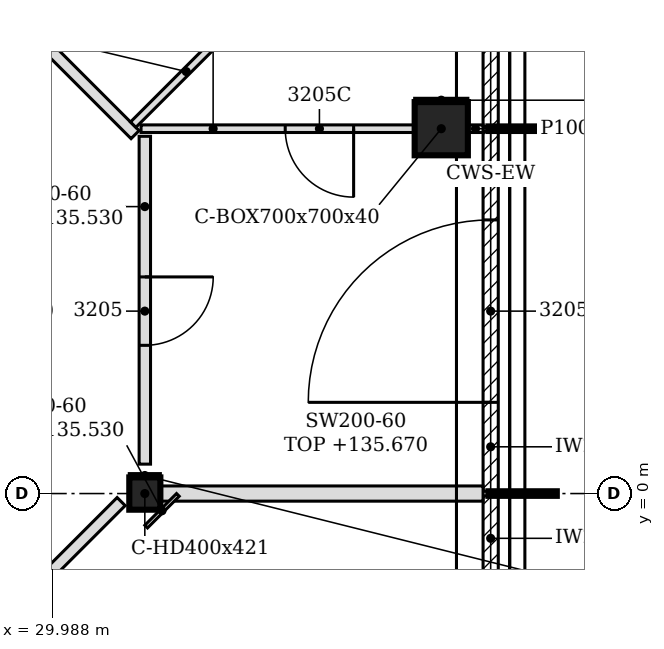
"""IFC4 building model, lengths in metres.
Left out: names, types, materials, properties, quantities, classifications, styles, units other than length and angle.
Written with IfcOpenShell. Run it as: python <this file> out.ifc"""

import sys

from ifc_helpers import new_model, si_unit, direction, frame, frame_2d, origin, origin_2d, place, context, subcontext, project, spatial, polyline, rectangle, hollow_rectangle, i_section, outline, extrude, element, fill, save


model = new_model("IFC4")
c1 = context("Model", 3, precision=1e-05, world=origin(), true_north=direction((0.0, 1.0)))
c2 = subcontext(c1, "Body", "Model", "MODEL_VIEW")
j1 = project(units=[si_unit("LENGTHUNIT", "METRE"), si_unit("PLANEANGLEUNIT", "RADIAN")], contexts=[c1])
p1 = place(None, origin())
s1 = spatial("IfcSite", under=j1, at=p1, CompositionType="ELEMENT")
p2 = place(p1, origin())
s2 = spatial("IfcBuilding", under=s1, at=p2, CompositionType="ELEMENT")
p3 = place(p2, frame((0.0, 0.0, 132.6)))
s3 = spatial("IfcBuildingStorey", under=s2, at=p3, CompositionType="ELEMENT", Elevation=132.6)
p4 = place(p3, frame((35.1, 4.8, -0.15), z_axis=(0.0, 0.0, 1.0), x_axis=(1.0, 0.0, 0.0)))
e1 = element("IfcColumn", 1, at=p4, inside=s3, PredefinedType="COLUMN", context=c2, shape_type="SweptSolid", body=[
    extrude(hollow_rectangle(XDim=0.7, YDim=0.7, WallThickness=0.04, at=origin_2d()), origin(), (0.0, 0.0, 1.0), 3.6),
])
p5 = place(p3, frame((31.2, 0.0, -0.15), z_axis=(0.0, 0.0, 1.0), x_axis=(1.0, 0.0, 0.0)))
e2 = element("IfcColumn", 2, at=p5, inside=s3, PredefinedType="COLUMN", context=c2, shape_type="SweptSolid", body=[
    extrude(i_section(OverallWidth=0.409, OverallDepth=0.425, WebThickness=0.033, FlangeThickness=0.052, FilletRadius=0.015, at=origin_2d()), origin(), (0.0, 0.0, 1.0), 3.6),
])
p6 = place(p3, frame((35.75, -4.656, 0.0), z_axis=(0.0, 0.0, 1.0), x_axis=(0.0, 1.0, 0.0)))
e3 = element("IfcWall", 3, at=p6, inside=s3, PredefinedType="NOTDEFINED", context=c2, shape_type="SweptSolid", body=[
    extrude(rectangle(XDim=4.626, YDim=0.2, at=frame_2d((2.313, 0.0))), origin(), (0.0, 0.0, 1.0), 3.45),
])
p7 = place(p6, frame((1.108, 0.0, 0.0)))
e4 = element("IfcOpeningElement", 4, at=p7, cuts=e3, PredefinedType="OPENING", context=c2, shape_type="SweptSolid", body=[
    extrude(rectangle(XDim=2.4, YDim=2.4, at=frame_2d((1.2, 1.2))), frame((0.0, 0.11, 0.0), z_axis=(0.0, -1.0, 0.0), x_axis=(1.0, 0.0, 0.0)), (0.0, 0.0, 1.0), 0.22),
])
p8 = place(p3, frame((35.75, 0.03, 0.0), z_axis=(0.0, 0.0, 1.0), x_axis=(0.0, 1.0, 0.0)))
e5 = element("IfcWall", 5, at=p8, inside=s3, PredefinedType="NOTDEFINED", context=c2, shape_type="SweptSolid", body=[
    extrude(rectangle(XDim=4.74, YDim=0.2, at=frame_2d((2.37, 0.0))), origin(), (0.0, 0.0, 1.0), 3.45),
])
p9 = place(p8, frame((1.17, 0.0, 0.0)))
e6 = element("IfcOpeningElement", 6, at=p9, cuts=e5, PredefinedType="OPENING", context=c2, shape_type="SweptSolid", body=[
    extrude(rectangle(XDim=2.4, YDim=2.4, at=frame_2d((1.2, 1.2))), frame((0.0, 0.11, 0.0), z_axis=(0.0, -1.0, 0.0), x_axis=(1.0, 0.0, 0.0)), (0.0, 0.0, 1.0), 0.22),
])
p10 = place(p3, frame((35.75, 4.83, 0.0), z_axis=(0.0, 0.0, 1.0), x_axis=(0.0, 1.0, 0.0)))
e7 = element("IfcWall", 7, at=p10, inside=s3, PredefinedType="NOTDEFINED", context=c2, shape_type="SweptSolid", body=[
    extrude(rectangle(XDim=4.74, YDim=0.2, at=frame_2d((2.37, 0.0))), origin(), (0.0, 0.0, 1.0), 3.45),
])
p11 = place(p10, frame((1.17, 0.0, 0.0)))
e8 = element("IfcOpeningElement", 8, at=p11, cuts=e7, PredefinedType="OPENING", context=c2, shape_type="SweptSolid", body=[
    extrude(rectangle(XDim=2.4, YDim=2.4, at=frame_2d((1.2, 1.2))), frame((0.0, 0.11, 0.0), z_axis=(0.0, -1.0, 0.0), x_axis=(1.0, 0.0, 0.0)), (0.0, 0.0, 1.0), 0.22),
])
p12 = place(p3, frame((22.722, -8.272, 0.0), z_axis=(0.0, 0.0, 1.0), x_axis=(0.707106781187, 0.707106781187, 0.0)))
e9 = element("IfcWall", 9, at=p12, inside=s3, PredefinedType="PARTITIONING", context=c2, shape_type="SweptSolid", body=[
    extrude(rectangle(XDim=11.549, YDim=0.15, at=frame_2d((5.774, 0.0))), origin(), (0.0, 0.0, 1.0), 2.88),
])
p13 = place(p12, frame((1.925, 0.0, 0.0)))
e10 = element("IfcOpeningElement", 10, at=p13, cuts=e9, PredefinedType="OPENING", context=c2, shape_type="SweptSolid", body=[
    extrude(rectangle(XDim=0.9, YDim=2.1, at=frame_2d((0.45, 1.05))), frame((0.0, 0.085, 0.0), z_axis=(0.0, -1.0, 0.0), x_axis=(1.0, 0.0, 0.0)), (0.0, 0.0, 1.0), 0.17),
])
p14 = place(p12, frame((9.065, 0.0, 0.0)))
e11 = element("IfcOpeningElement", 11, at=p14, cuts=e9, PredefinedType="OPENING", context=c2, shape_type="SweptSolid", body=[
    extrude(rectangle(XDim=0.9, YDim=2.1, at=frame_2d((0.45, 1.05))), frame((0.0, 0.085, 0.0), z_axis=(0.0, -1.0, 0.0), x_axis=(1.0, 0.0, 0.0)), (0.0, 0.0, 1.0), 0.17),
])
p15 = place(p3, frame((31.405, 0.0, 0.0), z_axis=(0.0, 0.0, 1.0), x_axis=(1.0, 0.0, 0.0)))
e12 = element("IfcWall", 12, at=p15, inside=s3, PredefinedType="PARTITIONING", context=c2, shape_type="SweptSolid", body=[
    extrude(outline(polyline([(0.0, 0.0), (4.245, 0.0), (4.246, 3.07), (3.845, 3.07), (3.844, 2.93), (3.545, 2.93), (3.543, 3.07), (0.0, 3.07), (0.0, 0.0)])), frame((0.0, 0.1, 0.0), z_axis=(0.0, -1.0, 0.0), x_axis=(1.0, 0.0, 0.0)), (0.0, 0.0, 1.0), 0.2),
])
p16 = place(p3, frame((31.2, 0.387, 0.0), z_axis=(0.0, 0.0, 1.0), x_axis=(0.0, 1.0, 0.0)))
e13 = element("IfcWall", 13, at=p16, inside=s3, PredefinedType="PARTITIONING", context=c2, shape_type="SweptSolid", body=[
    extrude(rectangle(XDim=4.313, YDim=0.15, at=frame_2d((2.156, 0.0))), origin(), (0.0, 0.0, 1.0), 2.93),
])
p17 = place(p16, frame((1.563, 0.0, 0.0)))
e14 = element("IfcOpeningElement", 14, at=p17, cuts=e13, PredefinedType="OPENING", context=c2, shape_type="SweptSolid", body=[
    extrude(rectangle(XDim=0.9, YDim=2.1, at=frame_2d((0.45, 1.05))), frame((0.0, 0.085, 0.0), z_axis=(0.0, -1.0, 0.0), x_axis=(1.0, 0.0, 0.0)), (0.0, 0.0, 1.0), 0.17),
])
p18 = place(p3, frame((31.072, 4.722, 0.0), z_axis=(0.0, 0.0, 1.0), x_axis=(-0.707106781187, 0.707106781187, 0.0)))
e15 = element("IfcWall", 15, at=p18, inside=s3, PredefinedType="PARTITIONING", context=c2, shape_type="SweptSolid", body=[
    extrude(rectangle(XDim=23.688, YDim=0.15, at=frame_2d((11.844, 0.0))), origin(), (0.0, 0.0, 1.0), 2.73),
])
p19 = place(p18, frame((8.135, 0.0, 0.0)))
e16 = element("IfcOpeningElement", 16, at=p19, cuts=e15, PredefinedType="OPENING", context=c2, shape_type="SweptSolid", body=[
    extrude(rectangle(XDim=0.9, YDim=2.1, at=frame_2d((0.45, 1.05))), frame((0.0, 0.085, 0.0), z_axis=(0.0, -1.0, 0.0), x_axis=(1.0, 0.0, 0.0)), (0.0, 0.0, 1.0), 0.17),
])
p20 = place(p18, frame((13.091, 0.0, 0.0)))
e17 = element("IfcOpeningElement", 17, at=p20, cuts=e15, PredefinedType="OPENING", context=c2, shape_type="SweptSolid", body=[
    extrude(rectangle(XDim=0.9, YDim=2.1, at=frame_2d((0.45, 1.05))), frame((0.0, 0.085, 0.0), z_axis=(0.0, -1.0, 0.0), x_axis=(1.0, 0.0, 0.0)), (0.0, 0.0, 1.0), 0.17),
])
p21 = place(p18, frame((18.69, 0.0, 0.0)))
e18 = element("IfcOpeningElement", 18, at=p21, cuts=e15, PredefinedType="OPENING", context=c2, shape_type="SweptSolid", body=[
    extrude(rectangle(XDim=0.9, YDim=2.1, at=frame_2d((0.45, 1.05))), frame((0.0, 0.085, 0.0), z_axis=(0.0, -1.0, 0.0), x_axis=(1.0, 0.0, 0.0)), (0.0, 0.0, 1.0), 0.17),
])
p22 = place(p3, frame((31.15, 4.8, 0.0), z_axis=(0.0, 0.0, 1.0), x_axis=(1.0, 0.0, 0.0)))
e19 = element("IfcWall", 19, at=p22, inside=s3, PredefinedType="PARTITIONING", context=c2, shape_type="SweptSolid", body=[
    extrude(outline(polyline([(0.0, 0.0), (3.6, 0.0), (3.6, 3.07), (0.2, 3.07), (0.198, 2.93), (0.0, 2.93), (0.0, 0.0)])), frame((0.0, 0.05, 0.0), z_axis=(0.0, -1.0, 0.0), x_axis=(1.0, 0.0, 0.0)), (0.0, 0.0, 1.0), 0.1),
])
p23 = place(p22, frame((1.897, 0.0, 0.0)))
e20 = element("IfcOpeningElement", 20, at=p23, cuts=e19, PredefinedType="OPENING", context=c2, shape_type="SweptSolid", body=[
    extrude(rectangle(XDim=0.9, YDim=2.1, at=frame_2d((0.45, 1.05))), frame((0.0, 0.06, 0.0), z_axis=(0.0, -1.0, 0.0), x_axis=(1.0, 0.0, 0.0)), (0.0, 0.0, 1.0), 0.12),
])
p24 = place(p3, frame((35.45, 4.8, 0.0), z_axis=(0.0, 0.0, 1.0), x_axis=(1.0, 0.0, 0.0)))
e21 = element("IfcWall", 21, at=p24, inside=s3, PredefinedType="PARTITIONING", context=c2, shape_type="SweptSolid", body=[
    extrude(rectangle(XDim=0.2, YDim=0.1, at=frame_2d((0.1, 0.0))), origin(), (0.0, 0.0, 1.0), 3.45),
])
p25 = place(p3, frame((31.047, 4.853, 0.0), z_axis=(0.0, 0.0, 1.0), x_axis=(0.707044963048, 0.707168593921, 0.0)))
e22 = element("IfcWall", 22, at=p25, inside=s3, PredefinedType="PARTITIONING", context=c2, shape_type="SweptSolid", body=[
    extrude(rectangle(XDim=1.975, YDim=0.1, at=frame_2d((0.987, 0.0))), origin(), (0.0, 0.0, 1.0), 2.88),
])
p26 = place(p3, frame((31.218, -0.435, 0.0), z_axis=(0.0, 0.0, 1.0), x_axis=(0.706899813022, 0.70731368879, 0.0)))
e23 = element("IfcWall", 23, at=p26, inside=s3, PredefinedType="PARTITIONING", context=c2, shape_type="SweptSolid", body=[
    extrude(rectangle(XDim=0.59, YDim=0.05, at=frame_2d((0.295, 0.0))), origin(), (0.0, 0.0, 1.0), 2.93),
])
p27 = place(p3, frame((30.996, 0.238, 0.0), z_axis=(0.0, 0.0, 1.0), x_axis=(1.0, 0.0, 0.0)))
e24 = element("IfcWall", 24, at=p27, inside=s3, PredefinedType="PARTITIONING", context=c2, shape_type="SweptSolid", body=[
    extrude(rectangle(XDim=0.409, YDim=0.05, at=frame_2d((0.205, 0.0))), origin(), (0.0, 0.0, 1.0), 2.93),
])
p28 = place(p3, frame((34.75, 5.175, 0.0), z_axis=(0.0, 0.0, 1.0), x_axis=(1.0, 0.0, 0.0)))
e25 = element("IfcWall", 25, at=p28, inside=s3, PredefinedType="PARTITIONING", context=c2, shape_type="SweptSolid", body=[
    extrude(rectangle(XDim=0.7, YDim=0.05, at=frame_2d((0.35, 0.0))), origin(), (0.0, 0.0, 1.0), 2.93),
])
p29 = place(p9, origin())
e26 = element("IfcDoor", 26, at=p29, inside=s3, OperationType="SINGLE_SWING_LEFT", PredefinedType="DOOR", context=c2, shape_type="SweptSolid", body=[
    extrude(rectangle(XDim=2.4, YDim=2.4, at=frame_2d((1.2, 1.2))), frame((0.0, 0.025, 0.0), z_axis=(0.0, -1.0, 0.0), x_axis=(1.0, 0.0, 0.0)), (0.0, 0.0, 1.0), 0.05),
])
fill(e6, e26)
p30 = place(p17, frame((0.9, 0.0, 0.0), z_axis=(0.0, 0.0, 1.0), x_axis=(-1.0, 0.0, 0.0)))
e27 = element("IfcDoor", 27, at=p30, inside=s3, OperationType="SINGLE_SWING_LEFT", PredefinedType="DOOR", context=c2, shape_type="SweptSolid", body=[
    extrude(rectangle(XDim=0.9, YDim=2.1, at=frame_2d((0.45, 1.05))), frame((0.0, 0.025, 0.0), z_axis=(0.0, -1.0, 0.0), x_axis=(1.0, 0.0, 0.0)), (0.0, 0.0, 1.0), 0.05),
])
fill(e14, e27)
p31 = place(p23, frame((0.9, 0.0, 0.0), z_axis=(0.0, 0.0, 1.0), x_axis=(-1.0, 0.0, 0.0)))
e28 = element("IfcDoor", 28, at=p31, inside=s3, OperationType="SINGLE_SWING_LEFT", PredefinedType="DOOR", context=c2, shape_type="SweptSolid", body=[
    extrude(rectangle(XDim=0.9, YDim=2.1, at=frame_2d((0.45, 1.05))), frame((0.0, 0.025, 0.0), z_axis=(0.0, -1.0, 0.0), x_axis=(1.0, 0.0, 0.0)), (0.0, 0.0, 1.0), 0.05),
])
fill(e20, e28)
save(model, sys.argv[1])
